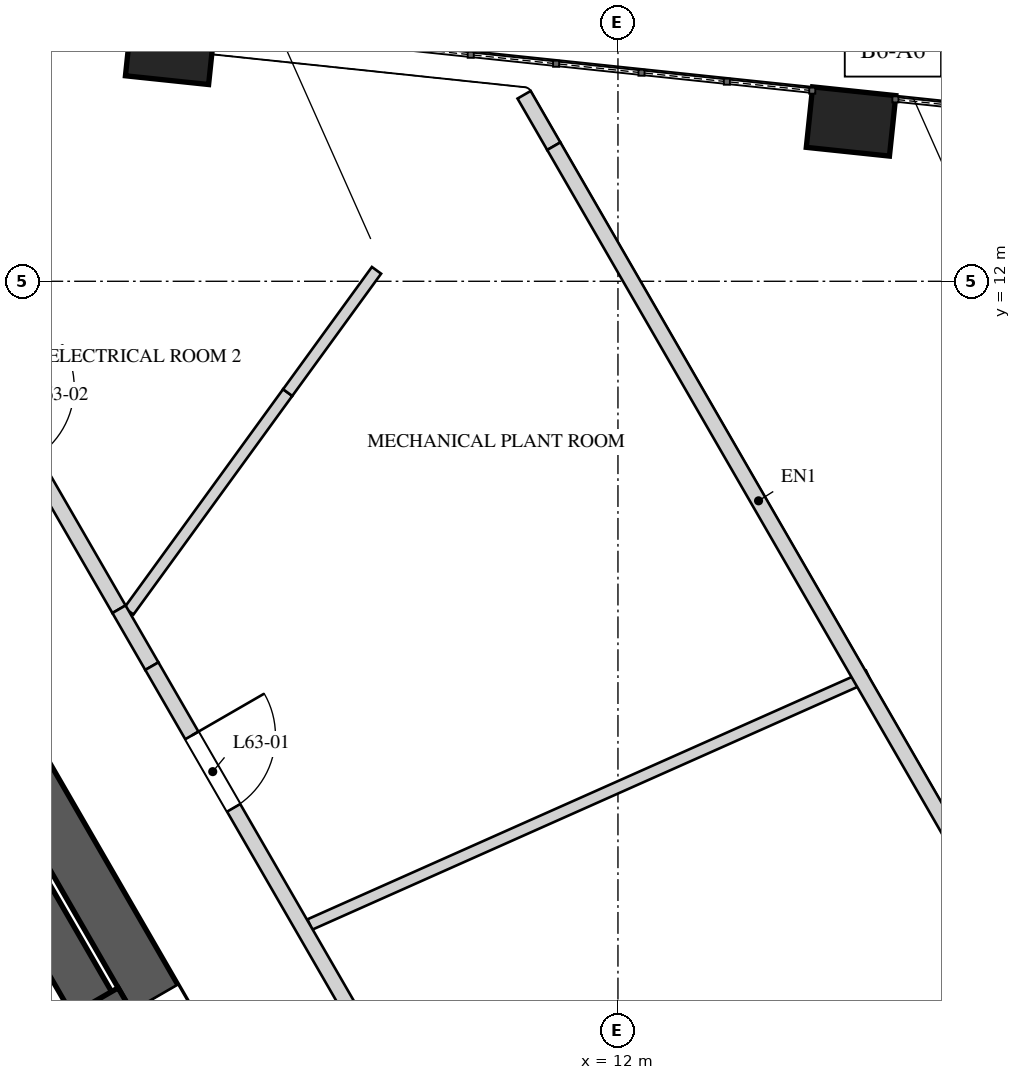
"""IFC4 building model, lengths in metres.
Left out: names, types, materials, properties, quantities, classifications, styles, units other than length and angle.
Written with IfcOpenShell. Run it as: python <this file> out.ifc"""

import sys

from ifc_helpers import new_model, si_unit, direction, frame, frame_2d, origin, origin_2d, place, context, subcontext, project, spatial, rectangle, extrude, element, fill, save


model = new_model("IFC4")
c1 = context("Model", 3, precision=1e-05, world=origin(), true_north=direction((0.0, 1.0)))
c2 = subcontext(c1, "Body", "Model", "MODEL_VIEW")
j1 = project(units=[si_unit("LENGTHUNIT", "METRE"), si_unit("PLANEANGLEUNIT", "RADIAN")], contexts=[c1])
p1 = place(None, origin())
s1 = spatial("IfcSite", under=j1, at=p1, CompositionType="ELEMENT")
p2 = place(p1, origin())
s2 = spatial("IfcBuilding", under=s1, at=p2, CompositionType="ELEMENT")
p3 = place(p2, frame((0.0, 0.0, 269.2)))
s3 = spatial("IfcBuildingStorey", under=s2, at=p3, CompositionType="ELEMENT", Elevation=269.2)
p4 = place(p3, frame((9.844, -4.25, 0.0), z_axis=(0.0, 0.0, 1.0), x_axis=(-0.500003331888, 0.866023480109, 0.0)))
e1 = element("IfcWall", 1, at=p4, inside=s3, PredefinedType="SHEAR", context=c2, shape_type="SweptSolid", body=[
    extrude(rectangle(XDim=17.205, YDim=0.7, at=frame_2d((8.603, 0.0))), origin(), (0.0, 0.0, 1.0), 5.2),
])
p5 = place(p4, frame((6.877, 0.0, 0.0)))
e2 = element("IfcOpeningElement", 2, at=p5, cuts=e1, PredefinedType="OPENING", context=c2, shape_type="SweptSolid", body=[
    extrude(rectangle(XDim=1.0, YDim=2.4, at=frame_2d((0.5, 1.2))), frame((0.0, 0.36, 0.0), z_axis=(0.0, -1.0, 0.0), x_axis=(1.0, 0.0, 0.0)), (0.0, 0.0, 1.0), 0.72),
])
p6 = place(p4, frame((14.445, 0.0, 0.0)))
e3 = element("IfcOpeningElement", 3, at=p6, cuts=e1, PredefinedType="OPENING", context=c2, shape_type="SweptSolid", body=[
    extrude(rectangle(XDim=0.8, YDim=2.1, at=frame_2d((0.4, 1.05))), frame((0.0, 0.36, 0.0), z_axis=(0.0, -1.0, 0.0), x_axis=(1.0, 0.0, 0.0)), (0.0, 0.0, 1.0), 0.72),
])
for number, where, z_axis, x_axis in (
    (4, (15.067, 14.102, 0.0), (0.0, 0.0, 1.0), (-0.995, 0.105, 0.0)),
    (5, (6.109, 15.044, 0.0), (0.0, 0.0, 1.0), (-0.995, 0.105, 0.0)),
):
    element("IfcColumn", number, at=place(p3, frame(where, z_axis=z_axis, x_axis=x_axis)), inside=s3, PredefinedType="COLUMN", context=c2, shape_type="SweptSolid", body=[
        extrude(rectangle(XDim=1.1, YDim=0.8, at=origin_2d()), origin(), (0.0, 0.0, 1.0), 2.787),
    ])
p7 = place(p3, frame((5.178, 2.331, 0.0), z_axis=(0.0, 0.0, 1.0), x_axis=(-0.49998122708, 0.866036242063, 0.0)))
e6 = element("IfcWall", 6, at=p7, inside=s3, PredefinedType="SOLIDWALL", context=c2, shape_type="SweptSolid", body=[
    extrude(rectangle(XDim=4.9, YDim=0.6, at=frame_2d((2.45, 0.0))), origin(), (0.0, 0.0, 1.0), 4.85),
])
p8 = place(p3, frame((2.227, 0.743, 0.0), z_axis=(0.0, 0.0, 1.0), x_axis=(0.866022959057, 0.500004234368, 0.0)))
e7 = element("IfcWall", 7, at=p8, inside=s3, PredefinedType="SOLIDWALL", context=c2, shape_type="SweptSolid", body=[
    extrude(rectangle(XDim=3.75, YDim=0.2, at=frame_2d((1.875, 0.0))), origin(), (0.0, 0.0, 1.0), 4.85),
])
p9 = place(p3, frame((5.565, 7.66, 0.0), z_axis=(0.0, 0.0, 1.0), x_axis=(0.587787750024, 0.809015179661, 0.0)))
e8 = element("IfcWall", 8, at=p9, inside=s3, PredefinedType="PARTITIONING", context=c2, shape_type="SweptSolid", body=[
    extrude(rectangle(XDim=3.555, YDim=0.15, at=frame_2d((1.777, 0.0))), origin(), (0.0, 0.0, 1.0), 3.95),
])
p10 = place(p3, frame((7.655, 10.536, 0.0), z_axis=(0.0, 0.0, 1.0), x_axis=(0.587748103299, 0.809043983396, 0.0)))
e9 = element("IfcWall", 9, at=p10, inside=s3, PredefinedType="PARTITIONING", context=c2, shape_type="SweptSolid", body=[
    extrude(rectangle(XDim=1.988, YDim=0.15, at=frame_2d((0.994, 0.0))), origin(), (0.0, 0.0, 1.0), 4.85),
])
p11 = place(p3, frame((15.294, 6.81, 0.0), z_axis=(0.0, 0.0, 1.0), x_axis=(-0.91353850426, -0.406752260269, 0.0)))
e10 = element("IfcWall", 10, at=p11, inside=s3, PredefinedType="PARTITIONING", context=c2, shape_type="SweptSolid", body=[
    extrude(rectangle(XDim=8.044, YDim=0.15, at=frame_2d((4.022, 0.0))), origin(), (0.0, 0.0, 1.0), 4.85),
])
p12 = place(p3, frame((3.077, 11.771, 0.0), z_axis=(0.0, 0.0, 1.0), x_axis=(0.500007683529, -0.866020967652, 0.0)))
e11 = element("IfcWall", 11, at=p12, inside=s3, PredefinedType="SOLIDWALL", context=c2, shape_type="SweptSolid", body=[
    extrude(rectangle(XDim=4.717, YDim=0.2, at=frame_2d((2.359, 0.0))), origin(), (0.0, 0.0, 1.0), 4.85),
])
p13 = place(p12, frame((1.339, 0.0, 0.0)))
e12 = element("IfcOpeningElement", 12, at=p13, cuts=e11, PredefinedType="OPENING", context=c2, shape_type="SweptSolid", body=[
    extrude(rectangle(XDim=1.1, YDim=2.2, at=frame_2d((0.55, 1.1))), frame((0.0, 0.11, 0.0), z_axis=(0.0, -1.0, 0.0), x_axis=(1.0, 0.0, 0.0)), (0.0, 0.0, 1.0), 0.22),
])
p14 = place(p3, frame((5.436, 7.686, 0.0), z_axis=(0.0, 0.0, 1.0), x_axis=(0.500056482814, -0.86599279096, 0.0)))
e13 = element("IfcWall", 13, at=p14, inside=s3, PredefinedType="SOLIDWALL", context=c2, shape_type="SweptSolid", body=[
    extrude(rectangle(XDim=0.865, YDim=0.2, at=frame_2d((0.432, 0.0))), origin(), (0.0, 0.0, 1.0), 3.95),
])
p15 = place(p3, frame((5.868, 6.937, 0.0), z_axis=(0.0, 0.0, 1.0), x_axis=(0.499973847261, -0.866040502549, 0.0)))
e14 = element("IfcWall", 14, at=p15, inside=s3, PredefinedType="SOLIDWALL", context=c2, shape_type="SweptSolid", body=[
    extrude(rectangle(XDim=5.156, YDim=0.2, at=frame_2d((2.578, 0.0))), origin(), (0.0, 0.0, 1.0), 4.85),
])
p16 = place(p15, frame((1.052, 0.0, 0.0)))
e15 = element("IfcOpeningElement", 15, at=p16, cuts=e14, PredefinedType="OPENING", context=c2, shape_type="SweptSolid", body=[
    extrude(rectangle(XDim=1.1, YDim=2.2, at=frame_2d((0.55, 1.1))), frame((0.0, 0.11, 0.0), z_axis=(0.0, -1.0, 0.0), x_axis=(1.0, 0.0, 0.0)), (0.0, 0.0, 1.0), 0.22),
])
p17 = place(p3, frame((10.765, 14.454, 0.0), z_axis=(0.0, 0.0, 1.0), x_axis=(0.50003806587, -0.866003425329, 0.0)))
e16 = element("IfcWall", 16, at=p17, inside=s3, PredefinedType="SOLIDWALL", context=c2, shape_type="SweptSolid", body=[
    extrude(rectangle(XDim=0.781, YDim=0.2, at=frame_2d((0.391, 0.0))), origin(), (0.0, 0.0, 1.0), 3.95),
])
p18 = place(p3, frame((11.156, 13.777, 0.0), z_axis=(0.0, 0.0, 1.0), x_axis=(0.499984626538, -0.866034279475, 0.0)))
e17 = element("IfcWall", 17, at=p18, inside=s3, PredefinedType="SOLIDWALL", context=c2, shape_type="SweptSolid", body=[
    extrude(rectangle(XDim=10.775, YDim=0.2, at=frame_2d((5.387, 0.0))), origin(), (0.0, 0.0, 1.0), 4.85),
])
p19 = place(p5, origin())
e18 = element("IfcDoor", 18, at=p19, inside=s3, OperationType="SINGLE_SWING_RIGHT", PredefinedType="DOOR", context=c2, shape_type="SweptSolid", body=[
    extrude(rectangle(XDim=1.0, YDim=2.4, at=frame_2d((0.5, 1.2))), frame((0.0, 0.025, 0.0), z_axis=(0.0, -1.0, 0.0), x_axis=(1.0, 0.0, 0.0)), (0.0, 0.0, 1.0), 0.05),
])
fill(e2, e18)
p20 = place(p16, origin())
e19 = element("IfcDoor", 19, at=p20, inside=s3, OperationType="SINGLE_SWING_LEFT", PredefinedType="DOOR", context=c2, shape_type="SweptSolid", body=[
    extrude(rectangle(XDim=1.1, YDim=2.2, at=frame_2d((0.55, 1.1))), frame((0.0, 0.025, 0.0), z_axis=(0.0, -1.0, 0.0), x_axis=(1.0, 0.0, 0.0)), (0.0, 0.0, 1.0), 0.05),
])
fill(e15, e19)
save(model, sys.argv[1])
